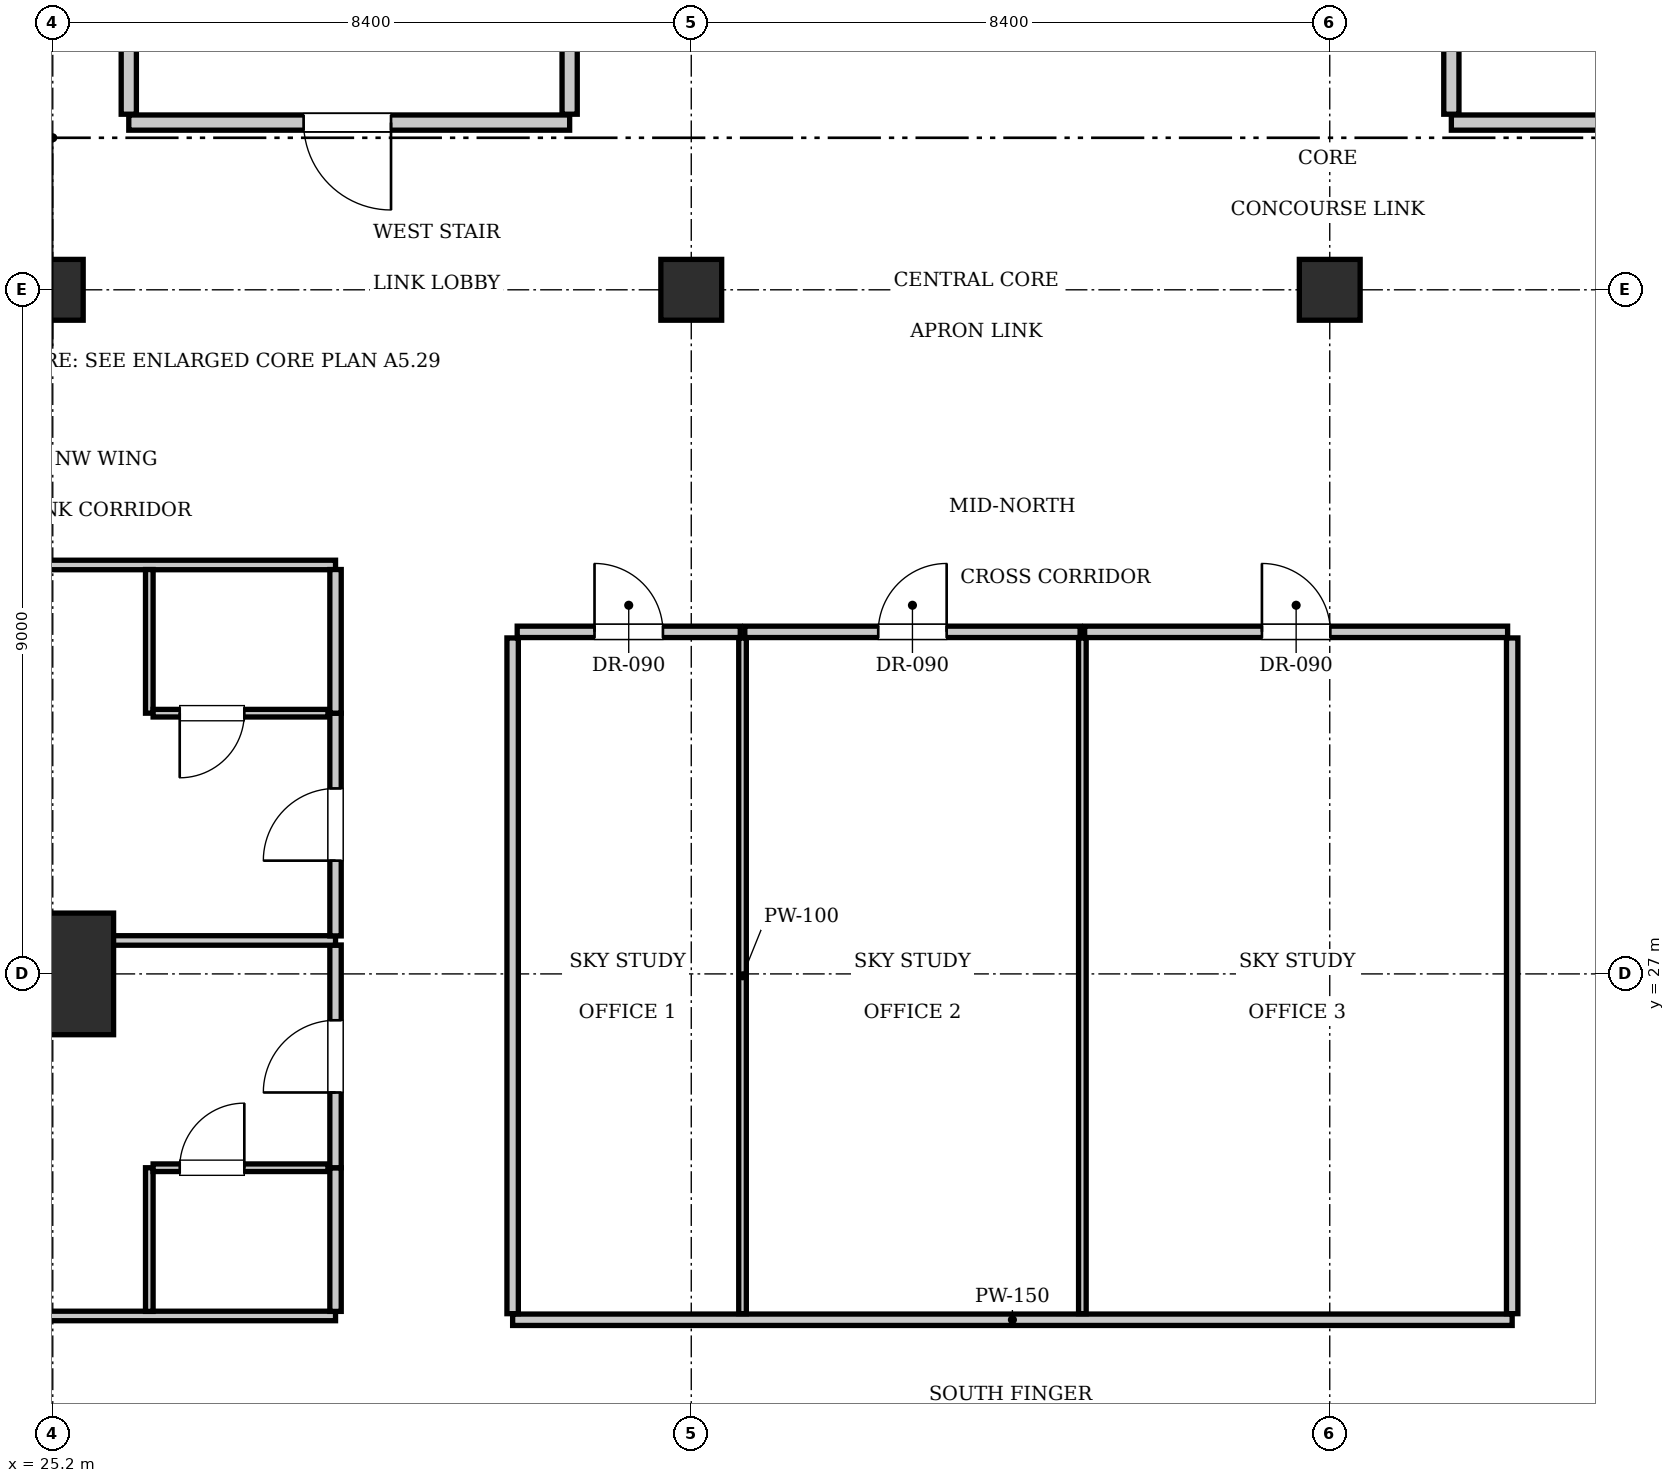
"""IFC4 building model, lengths in metres.
Left out: names, types, materials, properties, quantities, classifications, styles, units other than length and angle.
Written with IfcOpenShell. Run it as: python <this file> out.ifc"""

import sys

from ifc_helpers import new_model, si_unit, direction, frame, frame_2d, origin, origin_2d, place, context, subcontext, project, spatial, rectangle, extrude, element, fill, save


model = new_model("IFC4")
c1 = context("Model", 3, precision=1e-05, world=origin(), true_north=direction((0.0, 1.0)))
c2 = subcontext(c1, "Body", "Model", "MODEL_VIEW")
j1 = project(units=[si_unit("LENGTHUNIT", "METRE"), si_unit("PLANEANGLEUNIT", "RADIAN")], contexts=[c1])
p1 = place(None, origin())
s1 = spatial("IfcSite", under=j1, at=p1, CompositionType="ELEMENT")
p2 = place(p1, origin())
s2 = spatial("IfcBuilding", under=s1, at=p2, CompositionType="ELEMENT")
p3 = place(p2, frame((0.0, 0.0, 250.95)))
s3 = spatial("IfcBuildingStorey", under=s2, at=p3, CompositionType="ELEMENT", Elevation=250.95)
p4 = place(p3, frame((25.2, 27.0, 0.0), z_axis=(0.0, 0.0, 1.0), x_axis=(1.0, 0.0, 0.0)))
e1 = element("IfcColumn", 1, at=p4, inside=s3, PredefinedType="COLUMN", context=c2, shape_type="SweptSolid", body=[
    extrude(rectangle(XDim=1.6, YDim=1.6, at=origin_2d()), origin(), (0.0, 0.0, 1.0), 3.85),
])
for number, where, z_axis, x_axis in (
    (2, (25.2, 36.0, 0.0), (0.0, 0.0, 1.0), (1.0, 0.0, 0.0)),
    (3, (33.6, 36.0, 0.0), (0.0, 0.0, 1.0), (1.0, 0.0, 0.0)),
    (4, (42.0, 36.0, 0.0), (0.0, 0.0, 1.0), (1.0, 0.0, 0.0)),
):
    element("IfcColumn", number, at=place(p3, frame(where, z_axis=z_axis, x_axis=x_axis)), inside=s3, PredefinedType="COLUMN", context=c2, shape_type="SweptSolid", body=[
        extrude(rectangle(XDim=0.8, YDim=0.8, at=origin_2d()), origin(), (0.0, 0.0, 1.0), 3.85),
    ])
p5 = place(p3, frame((26.2, 38.2, 0.0), z_axis=(0.0, 0.0, 1.0), x_axis=(1.0, 0.0, 0.0)))
e5 = element("IfcWall", 5, at=p5, inside=s3, PredefinedType="PARTITIONING", context=c2, shape_type="SweptSolid", body=[
    extrude(rectangle(XDim=5.8, YDim=0.2, at=frame_2d((2.9, 0.0))), origin(), (0.0, 0.0, 1.0), 3.61),
])
p6 = place(p5, frame((2.3, 0.0, 0.0)))
e6 = element("IfcOpeningElement", 6, at=p6, cuts=e5, PredefinedType="OPENING", context=c2, shape_type="SweptSolid", body=[
    extrude(rectangle(XDim=1.15, YDim=2.15, at=frame_2d((0.575, 1.075))), frame((0.0, 0.11, 0.0), z_axis=(0.0, -1.0, 0.0), x_axis=(1.0, 0.0, 0.0)), (0.0, 0.0, 1.0), 0.22),
])
for number, where, z_axis, x_axis in (
    (7, (26.2, 38.31, 0.0), (0.0, 0.0, 1.0), (0.0, 1.0, 0.0)),
    (8, (32.0, 38.31, 0.0), (0.0, 0.0, 1.0), (0.0, 1.0, 0.0)),
):
    element("IfcWall", number, at=place(p3, frame(where, z_axis=z_axis, x_axis=x_axis)), inside=s3, PredefinedType="PARTITIONING", context=c2, shape_type="SweptSolid", body=[
        extrude(rectangle(XDim=3.07, YDim=0.2, at=frame_2d((1.535, 0.0))), origin(), (0.0, 0.0, 1.0), 3.61),
    ])
p7 = place(p3, frame((43.6, 38.2, 0.0), z_axis=(0.0, 0.0, 1.0), x_axis=(1.0, 0.0, 0.0)))
e9 = element("IfcWall", 9, at=p7, inside=s3, PredefinedType="PARTITIONING", context=c2, shape_type="SweptSolid", body=[
    extrude(rectangle(XDim=5.8, YDim=0.2, at=frame_2d((2.9, 0.0))), origin(), (0.0, 0.0, 1.0), 3.61),
])
p8 = place(p7, frame((2.3, 0.0, 0.0)))
e10 = element("IfcOpeningElement", 10, at=p8, cuts=e9, PredefinedType="OPENING", context=c2, shape_type="SweptSolid", body=[
    extrude(rectangle(XDim=1.15, YDim=2.15, at=frame_2d((0.575, 1.075))), frame((0.0, 0.11, 0.0), z_axis=(0.0, -1.0, 0.0), x_axis=(1.0, 0.0, 0.0)), (0.0, 0.0, 1.0), 0.22),
])
p9 = place(p3, frame((43.6, 38.31, 0.0), z_axis=(0.0, 0.0, 1.0), x_axis=(0.0, 1.0, 0.0)))
e11 = element("IfcWall", 11, at=p9, inside=s3, PredefinedType="PARTITIONING", context=c2, shape_type="SweptSolid", body=[
    extrude(rectangle(XDim=3.07, YDim=0.2, at=frame_2d((1.535, 0.0))), origin(), (0.0, 0.0, 1.0), 3.61),
])
p10 = place(p3, frame((31.25, 22.45, 0.0), z_axis=(0.0, 0.0, 1.0), x_axis=(1.0, 0.0, 0.0)))
e12 = element("IfcWall", 12, at=p10, inside=s3, PredefinedType="PARTITIONING", context=c2, shape_type="SweptSolid", body=[
    extrude(rectangle(XDim=13.15, YDim=0.15, at=frame_2d((6.575, 0.0))), origin(), (0.0, 0.0, 1.0), 3.61),
])
for number, where, z_axis, x_axis in (
    (13, (31.25, 22.53, 0.0), (0.0, 0.0, 1.0), (0.0, 1.0, 0.0)),
    (14, (44.4, 22.53, 0.0), (0.0, 0.0, 1.0), (0.0, 1.0, 0.0)),
):
    element("IfcWall", number, at=place(p3, frame(where, z_axis=z_axis, x_axis=x_axis)), inside=s3, PredefinedType="PARTITIONING", context=c2, shape_type="SweptSolid", body=[
        extrude(rectangle(XDim=8.89, YDim=0.15, at=frame_2d((4.445, 0.0))), origin(), (0.0, 0.0, 1.0), 3.61),
    ])
p11 = place(p3, frame((31.31, 31.5, 0.0), z_axis=(0.0, 0.0, 1.0), x_axis=(1.0, 0.0, 0.0)))
e15 = element("IfcWall", 15, at=p11, inside=s3, PredefinedType="PARTITIONING", context=c2, shape_type="SweptSolid", body=[
    extrude(rectangle(XDim=2.934, YDim=0.15, at=frame_2d((1.467, 0.0))), origin(), (0.0, 0.0, 1.0), 3.61),
])
p12 = place(p11, frame((1.017, 0.0, 0.0)))
e16 = element("IfcOpeningElement", 16, at=p12, cuts=e15, PredefinedType="OPENING", context=c2, shape_type="SweptSolid", body=[
    extrude(rectangle(XDim=0.9, YDim=2.1, at=frame_2d((0.45, 1.05))), frame((0.0, 0.085, 0.0), z_axis=(0.0, -1.0, 0.0), x_axis=(1.0, 0.0, 0.0)), (0.0, 0.0, 1.0), 0.17),
])
p13 = place(p3, frame((34.274, 22.53, 0.0), z_axis=(0.0, 0.0, 1.0), x_axis=(0.0, 1.0, 0.0)))
e17 = element("IfcWall", 17, at=p13, inside=s3, PredefinedType="PARTITIONING", context=c2, shape_type="SweptSolid", body=[
    extrude(rectangle(XDim=8.89, YDim=0.1, at=frame_2d((4.445, 0.0))), origin(), (0.0, 0.0, 1.0), 3.61),
])
p14 = place(p3, frame((34.304, 31.5, 0.0), z_axis=(0.0, 0.0, 1.0), x_axis=(1.0, 0.0, 0.0)))
e18 = element("IfcWall", 18, at=p14, inside=s3, PredefinedType="PARTITIONING", context=c2, shape_type="SweptSolid", body=[
    extrude(rectangle(XDim=4.411, YDim=0.15, at=frame_2d((2.206, 0.0))), origin(), (0.0, 0.0, 1.0), 3.61),
])
p15 = place(p14, frame((1.756, 0.0, 0.0)))
e19 = element("IfcOpeningElement", 19, at=p15, cuts=e18, PredefinedType="OPENING", context=c2, shape_type="SweptSolid", body=[
    extrude(rectangle(XDim=0.9, YDim=2.1, at=frame_2d((0.45, 1.05))), frame((0.0, 0.085, 0.0), z_axis=(0.0, -1.0, 0.0), x_axis=(1.0, 0.0, 0.0)), (0.0, 0.0, 1.0), 0.17),
])
p16 = place(p3, frame((38.746, 22.53, 0.0), z_axis=(0.0, 0.0, 1.0), x_axis=(0.0, 1.0, 0.0)))
e20 = element("IfcWall", 20, at=p16, inside=s3, PredefinedType="PARTITIONING", context=c2, shape_type="SweptSolid", body=[
    extrude(rectangle(XDim=8.89, YDim=0.1, at=frame_2d((4.445, 0.0))), origin(), (0.0, 0.0, 1.0), 3.61),
])
p17 = place(p3, frame((38.775, 31.5, 0.0), z_axis=(0.0, 0.0, 1.0), x_axis=(1.0, 0.0, 0.0)))
e21 = element("IfcWall", 21, at=p17, inside=s3, PredefinedType="PARTITIONING", context=c2, shape_type="SweptSolid", body=[
    extrude(rectangle(XDim=5.565, YDim=0.15, at=frame_2d((2.782, 0.0))), origin(), (0.0, 0.0, 1.0), 3.61),
])
p18 = place(p17, frame((2.332, 0.0, 0.0)))
e22 = element("IfcOpeningElement", 22, at=p18, cuts=e21, PredefinedType="OPENING", context=c2, shape_type="SweptSolid", body=[
    extrude(rectangle(XDim=0.9, YDim=2.1, at=frame_2d((0.45, 1.05))), frame((0.0, 0.085, 0.0), z_axis=(0.0, -1.0, 0.0), x_axis=(1.0, 0.0, 0.0)), (0.0, 0.0, 1.0), 0.17),
])
for number, where, z_axis, x_axis in (
    (23, (15.5, 22.5, 0.0), (0.0, 0.0, 1.0), (1.0, 0.0, 0.0)),
    (24, (15.5, 32.38, 0.0), (0.0, 0.0, 1.0), (1.0, 0.0, 0.0)),
):
    element("IfcWall", number, at=place(p3, frame(where, z_axis=z_axis, x_axis=x_axis)), inside=s3, PredefinedType="PARTITIONING", context=c2, shape_type="SweptSolid", body=[
        extrude(rectangle(XDim=13.42, YDim=0.125, at=frame_2d((6.71, 0.0))), origin(), (0.0, 0.0, 1.0), 3.61),
    ])
p19 = place(p3, frame((28.92, 22.56, 0.0), z_axis=(0.0, 0.0, 1.0), x_axis=(0.0, 1.0, 0.0)))
e25 = element("IfcWall", 25, at=p19, inside=s3, PredefinedType="PARTITIONING", context=c2, shape_type="SweptSolid", body=[
    extrude(rectangle(XDim=1.89, YDim=0.15, at=frame_2d((0.945, 0.0))), origin(), (0.0, 0.0, 1.0), 3.61),
])
p20 = place(p3, frame((28.92, 24.45, 0.0), z_axis=(0.0, 0.0, 1.0), x_axis=(0.0, 1.0, 0.0)))
e26 = element("IfcWall", 26, at=p20, inside=s3, PredefinedType="PARTITIONING", context=c2, shape_type="SweptSolid", body=[
    extrude(rectangle(XDim=2.93, YDim=0.15, at=frame_2d((1.465, 0.0))), origin(), (0.0, 0.0, 1.0), 3.61),
])
p21 = place(p20, frame((0.99, 0.0, 0.0)))
e27 = element("IfcOpeningElement", 27, at=p21, cuts=e26, PredefinedType="OPENING", context=c2, shape_type="SweptSolid", body=[
    extrude(rectangle(XDim=0.95, YDim=2.15, at=frame_2d((0.475, 1.075))), frame((0.0, 0.085, 0.0), z_axis=(0.0, -1.0, 0.0), x_axis=(1.0, 0.0, 0.0)), (0.0, 0.0, 1.0), 0.17),
])
p22 = place(p3, frame((26.47, 22.56, 0.0), z_axis=(0.0, 0.0, 1.0), x_axis=(0.0, 1.0, 0.0)))
e28 = element("IfcWall", 28, at=p22, inside=s3, PredefinedType="PARTITIONING", context=c2, shape_type="SweptSolid", body=[
    extrude(rectangle(XDim=1.89, YDim=0.1, at=frame_2d((0.945, 0.0))), origin(), (0.0, 0.0, 1.0), 3.61),
])
p23 = place(p3, frame((26.52, 24.45, 0.0), z_axis=(0.0, 0.0, 1.0), x_axis=(1.0, 0.0, 0.0)))
e29 = element("IfcWall", 29, at=p23, inside=s3, PredefinedType="PARTITIONING", context=c2, shape_type="SweptSolid", body=[
    extrude(rectangle(XDim=2.3, YDim=0.1, at=frame_2d((1.15, 0.0))), origin(), (0.0, 0.0, 1.0), 3.61),
])
p24 = place(p23, frame((0.35, 0.0, 0.0)))
e30 = element("IfcOpeningElement", 30, at=p24, cuts=e29, PredefinedType="OPENING", context=c2, shape_type="SweptSolid", body=[
    extrude(rectangle(XDim=0.85, YDim=2.1, at=frame_2d((0.425, 1.05))), frame((0.0, 0.06, 0.0), z_axis=(0.0, -1.0, 0.0), x_axis=(1.0, 0.0, 0.0)), (0.0, 0.0, 1.0), 0.12),
])
p25 = place(p3, frame((15.5, 27.44, 0.0), z_axis=(0.0, 0.0, 1.0), x_axis=(1.0, 0.0, 0.0)))
e31 = element("IfcWall", 31, at=p25, inside=s3, PredefinedType="PARTITIONING", context=c2, shape_type="SweptSolid", body=[
    extrude(rectangle(XDim=13.42, YDim=0.125, at=frame_2d((6.71, 0.0))), origin(), (0.0, 0.0, 1.0), 3.61),
])
p26 = place(p3, frame((28.92, 27.5, 0.0), z_axis=(0.0, 0.0, 1.0), x_axis=(0.0, 1.0, 0.0)))
e32 = element("IfcWall", 32, at=p26, inside=s3, PredefinedType="PARTITIONING", context=c2, shape_type="SweptSolid", body=[
    extrude(rectangle(XDim=2.93, YDim=0.15, at=frame_2d((1.465, 0.0))), origin(), (0.0, 0.0, 1.0), 3.61),
])
p27 = place(p26, frame((0.99, 0.0, 0.0)))
e33 = element("IfcOpeningElement", 33, at=p27, cuts=e32, PredefinedType="OPENING", context=c2, shape_type="SweptSolid", body=[
    extrude(rectangle(XDim=0.95, YDim=2.15, at=frame_2d((0.475, 1.075))), frame((0.0, 0.085, 0.0), z_axis=(0.0, -1.0, 0.0), x_axis=(1.0, 0.0, 0.0)), (0.0, 0.0, 1.0), 0.17),
])
p28 = place(p3, frame((28.92, 30.43, 0.0), z_axis=(0.0, 0.0, 1.0), x_axis=(0.0, 1.0, 0.0)))
e34 = element("IfcWall", 34, at=p28, inside=s3, PredefinedType="PARTITIONING", context=c2, shape_type="SweptSolid", body=[
    extrude(rectangle(XDim=1.89, YDim=0.15, at=frame_2d((0.945, 0.0))), origin(), (0.0, 0.0, 1.0), 3.61),
])
p29 = place(p3, frame((26.47, 30.43, 0.0), z_axis=(0.0, 0.0, 1.0), x_axis=(0.0, 1.0, 0.0)))
e35 = element("IfcWall", 35, at=p29, inside=s3, PredefinedType="PARTITIONING", context=c2, shape_type="SweptSolid", body=[
    extrude(rectangle(XDim=1.89, YDim=0.1, at=frame_2d((0.945, 0.0))), origin(), (0.0, 0.0, 1.0), 3.61),
])
p30 = place(p3, frame((26.52, 30.43, 0.0), z_axis=(0.0, 0.0, 1.0), x_axis=(1.0, 0.0, 0.0)))
e36 = element("IfcWall", 36, at=p30, inside=s3, PredefinedType="PARTITIONING", context=c2, shape_type="SweptSolid", body=[
    extrude(rectangle(XDim=2.3, YDim=0.1, at=frame_2d((1.15, 0.0))), origin(), (0.0, 0.0, 1.0), 3.61),
])
p31 = place(p30, frame((0.35, 0.0, 0.0)))
e37 = element("IfcOpeningElement", 37, at=p31, cuts=e36, PredefinedType="OPENING", context=c2, shape_type="SweptSolid", body=[
    extrude(rectangle(XDim=0.85, YDim=2.1, at=frame_2d((0.425, 1.05))), frame((0.0, 0.06, 0.0), z_axis=(0.0, -1.0, 0.0), x_axis=(1.0, 0.0, 0.0)), (0.0, 0.0, 1.0), 0.12),
])
p32 = place(p6, frame((1.15, 0.0, 0.0), z_axis=(0.0, 0.0, 1.0), x_axis=(-1.0, 0.0, 0.0)))
e38 = element("IfcDoor", 38, at=p32, inside=s3, OperationType="SINGLE_SWING_LEFT", PredefinedType="DOOR", context=c2, shape_type="SweptSolid", body=[
    extrude(rectangle(XDim=1.15, YDim=2.15, at=frame_2d((0.575, 1.075))), frame((0.0, 0.025, 0.0), z_axis=(0.0, -1.0, 0.0), x_axis=(1.0, 0.0, 0.0)), (0.0, 0.0, 1.0), 0.05),
])
fill(e6, e38)
p33 = place(p12, origin())
e39 = element("IfcDoor", 39, at=p33, inside=s3, OperationType="SINGLE_SWING_LEFT", PredefinedType="DOOR", context=c2, shape_type="SweptSolid", body=[
    extrude(rectangle(XDim=0.9, YDim=2.1, at=frame_2d((0.45, 1.05))), frame((0.0, 0.025, 0.0), z_axis=(0.0, -1.0, 0.0), x_axis=(1.0, 0.0, 0.0)), (0.0, 0.0, 1.0), 0.05),
])
fill(e16, e39)
p34 = place(p15, origin())
e40 = element("IfcDoor", 40, at=p34, inside=s3, OperationType="SINGLE_SWING_RIGHT", PredefinedType="DOOR", context=c2, shape_type="SweptSolid", body=[
    extrude(rectangle(XDim=0.9, YDim=2.1, at=frame_2d((0.45, 1.05))), frame((0.0, 0.025, 0.0), z_axis=(0.0, -1.0, 0.0), x_axis=(1.0, 0.0, 0.0)), (0.0, 0.0, 1.0), 0.05),
])
fill(e19, e40)
p35 = place(p18, origin())
e41 = element("IfcDoor", 41, at=p35, inside=s3, OperationType="SINGLE_SWING_LEFT", PredefinedType="DOOR", context=c2, shape_type="SweptSolid", body=[
    extrude(rectangle(XDim=0.9, YDim=2.1, at=frame_2d((0.45, 1.05))), frame((0.0, 0.025, 0.0), z_axis=(0.0, -1.0, 0.0), x_axis=(1.0, 0.0, 0.0)), (0.0, 0.0, 1.0), 0.05),
])
fill(e22, e41)
p36 = place(p24, origin())
e42 = element("IfcDoor", 42, at=p36, inside=s3, OperationType="SINGLE_SWING_RIGHT", PredefinedType="DOOR", context=c2, shape_type="SweptSolid", body=[
    extrude(rectangle(XDim=0.85, YDim=2.1, at=frame_2d((0.425, 1.05))), frame((0.0, 0.025, 0.0), z_axis=(0.0, -1.0, 0.0), x_axis=(1.0, 0.0, 0.0)), (0.0, 0.0, 1.0), 0.05),
])
fill(e30, e42)
p37 = place(p21, origin())
e43 = element("IfcDoor", 43, at=p37, inside=s3, OperationType="SINGLE_SWING_LEFT", PredefinedType="DOOR", context=c2, shape_type="SweptSolid", body=[
    extrude(rectangle(XDim=0.95, YDim=2.15, at=frame_2d((0.475, 1.075))), frame((0.0, 0.025, 0.0), z_axis=(0.0, -1.0, 0.0), x_axis=(1.0, 0.0, 0.0)), (0.0, 0.0, 1.0), 0.05),
])
fill(e27, e43)
p38 = place(p31, frame((0.85, 0.0, 0.0), z_axis=(0.0, 0.0, 1.0), x_axis=(-1.0, 0.0, 0.0)))
e44 = element("IfcDoor", 44, at=p38, inside=s3, OperationType="SINGLE_SWING_RIGHT", PredefinedType="DOOR", context=c2, shape_type="SweptSolid", body=[
    extrude(rectangle(XDim=0.85, YDim=2.1, at=frame_2d((0.425, 1.05))), frame((0.0, 0.025, 0.0), z_axis=(0.0, -1.0, 0.0), x_axis=(1.0, 0.0, 0.0)), (0.0, 0.0, 1.0), 0.05),
])
fill(e37, e44)
p39 = place(p27, origin())
e45 = element("IfcDoor", 45, at=p39, inside=s3, OperationType="SINGLE_SWING_LEFT", PredefinedType="DOOR", context=c2, shape_type="SweptSolid", body=[
    extrude(rectangle(XDim=0.95, YDim=2.15, at=frame_2d((0.475, 1.075))), frame((0.0, 0.025, 0.0), z_axis=(0.0, -1.0, 0.0), x_axis=(1.0, 0.0, 0.0)), (0.0, 0.0, 1.0), 0.05),
])
fill(e33, e45)
save(model, sys.argv[1])
